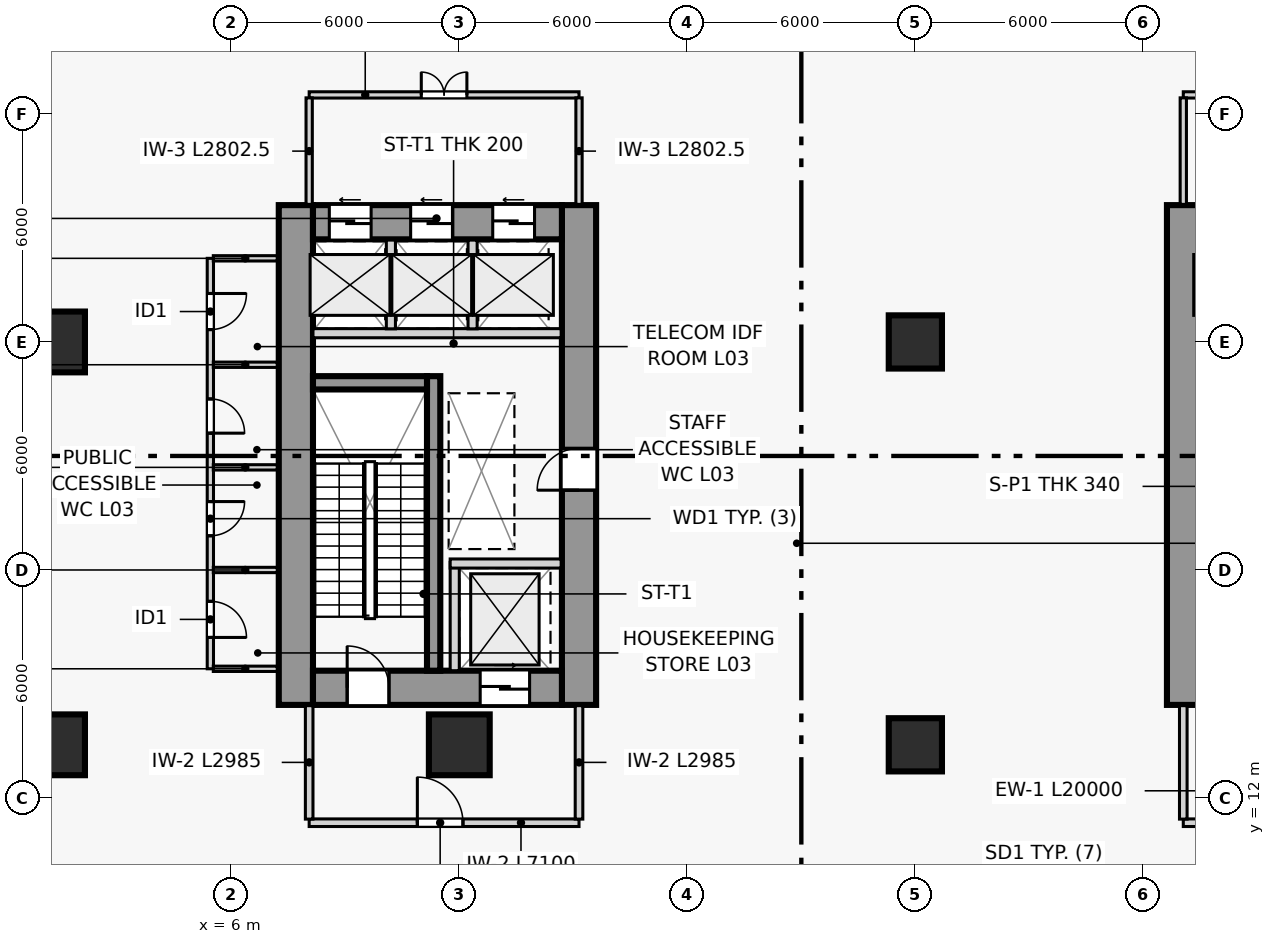
"""IFC4 building model, lengths in metres.
Left out: names, types, materials, properties, quantities, classifications, styles, units other than length and angle.
Written with IfcOpenShell. Run it as: python <this file> out.ifc"""

import sys

from ifc_helpers import new_model, si_unit, direction, frame, frame_2d, origin, origin_2d, place, context, subcontext, project, spatial, rectangle, extrude, source, transform, mapped, element, fill, save


model = new_model("IFC4")
c1 = context("Model", 3, precision=1e-05, world=origin(), true_north=direction((0.0, 1.0)))
c2 = subcontext(c1, "Body", "Model", "MODEL_VIEW")
j1 = project(units=[si_unit("LENGTHUNIT", "METRE"), si_unit("PLANEANGLEUNIT", "RADIAN")], contexts=[c1])
p1 = place(None, origin())
s1 = spatial("IfcSite", under=j1, at=p1, CompositionType="ELEMENT")
p2 = place(p1, origin())
s2 = spatial("IfcBuilding", under=s1, at=p2, CompositionType="ELEMENT")
p3 = place(p2, frame((0.0, 0.0, 13.5)))
s3 = spatial("IfcBuildingStorey", under=s2, at=p3, CompositionType="ELEMENT", Elevation=13.5)
p4 = place(p3, frame((7.7, 14.45, 0.0), z_axis=(0.0, 0.0, 1.0), x_axis=(0.0, 1.0, 0.0)))
e1 = element("IfcWall", 1, at=p4, inside=s3, PredefinedType="SHEAR", context=c2, shape_type="SweptSolid", body=[
    extrude(rectangle(XDim=13.15, YDim=0.9, at=frame_2d((6.575, 0.0))), origin(), (0.0, 0.0, 1.0), 4.5),
])
p5 = place(p3, frame((15.15, 14.45, 0.0), z_axis=(0.0, 0.0, 1.0), x_axis=(0.0, 1.0, 0.0)))
e2 = element("IfcWall", 2, at=p5, inside=s3, PredefinedType="SHEAR", context=c2, shape_type="SweptSolid", body=[
    extrude(rectangle(XDim=13.15, YDim=0.9, at=frame_2d((6.575, 0.0))), origin(), (0.0, 0.0, 1.0), 4.5),
])
p6 = place(p5, frame((5.65, 0.0, 0.0)))
e3 = element("IfcOpeningElement", 3, at=p6, cuts=e2, PredefinedType="OPENING", context=c2, shape_type="SweptSolid", body=[
    extrude(rectangle(XDim=1.1, YDim=2.2, at=frame_2d((0.55, 1.1))), frame((0.0, 0.46, 0.0), z_axis=(0.0, -1.0, 0.0), x_axis=(1.0, 0.0, 0.0)), (0.0, 0.0, 1.0), 0.92),
])
p7 = place(p3, frame((8.15, 14.9, 0.0), z_axis=(0.0, 0.0, 1.0), x_axis=(1.0, 0.0, 0.0)))
e4 = element("IfcWall", 4, at=p7, inside=s3, PredefinedType="SHEAR", context=c2, shape_type="SweptSolid", body=[
    extrude(rectangle(XDim=6.55, YDim=0.9, at=frame_2d((3.275, 0.0))), origin(), (0.0, 0.0, 1.0), 4.5),
])
p8 = place(p7, frame((0.9, 0.0, 0.0)))
e5 = element("IfcOpeningElement", 5, at=p8, cuts=e4, PredefinedType="OPENING", context=c2, shape_type="SweptSolid", body=[
    extrude(rectangle(XDim=1.1, YDim=2.2, at=frame_2d((0.55, 1.1))), frame((0.0, 0.46, 0.0), z_axis=(0.0, -1.0, 0.0), x_axis=(1.0, 0.0, 0.0)), (0.0, 0.0, 1.0), 0.92),
])
p9 = place(p7, frame((4.4, 0.0, 0.0)))
e6 = element("IfcOpeningElement", 6, at=p9, cuts=e4, PredefinedType="OPENING", context=c2, shape_type="SweptSolid", body=[
    extrude(rectangle(XDim=1.3, YDim=2.2, at=frame_2d((0.65, 1.1))), frame((0.0, 0.46, 0.0), z_axis=(0.0, -1.0, 0.0), x_axis=(1.0, 0.0, 0.0)), (0.0, 0.0, 1.0), 0.92),
])
p10 = place(p3, frame((8.15, 27.15, 0.0), z_axis=(0.0, 0.0, 1.0), x_axis=(1.0, 0.0, 0.0)))
e7 = element("IfcWall", 7, at=p10, inside=s3, PredefinedType="SHEAR", context=c2, shape_type="SweptSolid", body=[
    extrude(rectangle(XDim=6.55, YDim=0.9, at=frame_2d((3.275, 0.0))), origin(), (0.0, 0.0, 1.0), 4.5),
])
p11 = place(p10, frame((0.43, 0.0, 0.0)))
e8 = element("IfcOpeningElement", 8, at=p11, cuts=e7, PredefinedType="OPENING", context=c2, shape_type="SweptSolid", body=[
    extrude(rectangle(XDim=1.1, YDim=2.2, at=frame_2d((0.55, 1.1))), frame((0.0, 0.46, 0.0), z_axis=(0.0, -1.0, 0.0), x_axis=(1.0, 0.0, 0.0)), (0.0, 0.0, 1.0), 0.92),
])
p12 = place(p10, frame((2.57, 0.0, 0.0)))
e9 = element("IfcOpeningElement", 9, at=p12, cuts=e7, PredefinedType="OPENING", context=c2, shape_type="SweptSolid", body=[
    extrude(rectangle(XDim=1.1, YDim=2.2, at=frame_2d((0.55, 1.1))), frame((0.0, 0.46, 0.0), z_axis=(0.0, -1.0, 0.0), x_axis=(1.0, 0.0, 0.0)), (0.0, 0.0, 1.0), 0.92),
])
p13 = place(p10, frame((4.73, 0.0, 0.0)))
e10 = element("IfcOpeningElement", 10, at=p13, cuts=e7, PredefinedType="OPENING", context=c2, shape_type="SweptSolid", body=[
    extrude(rectangle(XDim=1.1, YDim=2.2, at=frame_2d((0.55, 1.1))), frame((0.0, 0.46, 0.0), z_axis=(0.0, -1.0, 0.0), x_axis=(1.0, 0.0, 0.0)), (0.0, 0.0, 1.0), 0.92),
])
p14 = place(p3, frame((31.07, 14.45, 0.0), z_axis=(0.0, 0.0, 1.0), x_axis=(0.0, 1.0, 0.0)))
e11 = element("IfcWall", 11, at=p14, inside=s3, PredefinedType="SHEAR", context=c2, shape_type="SweptSolid", body=[
    extrude(rectangle(XDim=13.15, YDim=0.9, at=frame_2d((6.575, 0.0))), origin(), (0.0, 0.0, 1.0), 4.5),
])
p15 = place(p3, frame((11.325, 15.35, 0.0), z_axis=(0.0, 0.0, 1.0), x_axis=(0.0, 1.0, 0.0)))
e12 = element("IfcWall", 12, at=p15, inside=s3, PredefinedType="SHEAR", context=c2, shape_type="SweptSolid", body=[
    extrude(rectangle(XDim=7.75, YDim=0.35, at=frame_2d((3.875, 0.0))), origin(), (0.0, 0.0, 1.0), 4.5),
])
p16 = place(p3, frame((8.15, 22.925, 0.0), z_axis=(0.0, 0.0, 1.0), x_axis=(1.0, 0.0, 0.0)))
e13 = element("IfcWall", 13, at=p16, inside=s3, PredefinedType="SHEAR", context=c2, shape_type="SweptSolid", body=[
    extrude(rectangle(XDim=3.0, YDim=0.35, at=frame_2d((1.5, 0.0))), origin(), (0.0, 0.0, 1.0), 4.5),
])
m1 = source(origin(), c2, "Body", "SweptSolid", [
    extrude(rectangle(XDim=1.6, YDim=1.6, at=origin_2d()), origin(), (0.0, 0.0, 1.0), 4.5),
])
for number, where, z_axis, x_axis in (
    (14, (1.35, 13.4, 0.0), (0.0, 0.0, 1.0), (1.0, 0.0, 0.0)),
    (15, (1.35, 24.0, 0.0), (0.0, 0.0, 1.0), (1.0, 0.0, 0.0)),
    (16, (12.0, 13.4, 0.0), (0.0, 0.0, 1.0), (1.0, 0.0, 0.0)),
):
    element("IfcColumn", number, at=place(p3, frame(where, z_axis=z_axis, x_axis=x_axis)), inside=s3, PredefinedType="COLUMN", context=c2, shape_type="MappedRepresentation", body=[
        mapped(m1, transform((0.0, 0.0, 0.0), scale=1.0)),
    ])
m2 = source(origin(), c2, "Body", "SweptSolid", [
    extrude(rectangle(XDim=1.4, YDim=1.4, at=origin_2d()), origin(), (0.0, 0.0, 1.0), 4.5),
])
for number, where, z_axis, x_axis in (
    (17, (24.0, 13.4, 0.0), (0.0, 0.0, 1.0), (1.0, 0.0, 0.0)),
    (18, (24.0, 24.0, 0.0), (0.0, 0.0, 1.0), (1.0, 0.0, 0.0)),
):
    element("IfcColumn", number, at=place(p3, frame(where, z_axis=z_axis, x_axis=x_axis)), inside=s3, PredefinedType="COLUMN", context=c2, shape_type="MappedRepresentation", body=[
        mapped(m2, transform((0.0, 0.0, 0.0), scale=1.0)),
    ])
p17 = place(p3, frame((11.88, 15.35, 0.0), z_axis=(0.0, 0.0, 1.0), x_axis=(0.0, 1.0, 0.0)))
e19 = element("IfcWall", 19, at=p17, inside=s3, PredefinedType="PARTITIONING", context=c2, shape_type="SweptSolid", body=[
    extrude(rectangle(XDim=2.85, YDim=0.24, at=frame_2d((1.425, 0.0))), origin(), (0.0, 0.0, 1.0), 4.16),
])
p18 = place(p3, frame((11.76, 18.17, 0.0), z_axis=(0.0, 0.0, 1.0), x_axis=(1.0, 0.0, 0.0)))
e20 = element("IfcWall", 20, at=p18, inside=s3, PredefinedType="PARTITIONING", context=c2, shape_type="SweptSolid", body=[
    extrude(rectangle(XDim=2.92, YDim=0.24, at=frame_2d((1.46, 0.0))), origin(), (0.0, 0.0, 1.0), 4.16),
])
p19 = place(p3, frame((8.05, 11.35, 0.0), z_axis=(0.0, 0.0, 1.0), x_axis=(1.0, 0.0, 0.0)))
e21 = element("IfcWall", 21, at=p19, inside=s3, PredefinedType="PARTITIONING", context=c2, shape_type="SweptSolid", body=[
    extrude(rectangle(XDim=7.1, YDim=0.2, at=frame_2d((3.55, 0.0))), origin(), (0.0, 0.0, 1.0), 4.16),
])
p20 = place(p19, frame((2.846, 0.0, 0.0)))
e22 = element("IfcOpeningElement", 22, at=p20, cuts=e21, PredefinedType="OPENING", context=c2, shape_type="SweptSolid", body=[
    extrude(rectangle(XDim=1.2, YDim=2.2, at=frame_2d((0.6, 1.1))), frame((0.0, 0.11, 0.0), z_axis=(0.0, -1.0, 0.0), x_axis=(1.0, 0.0, 0.0)), (0.0, 0.0, 1.0), 0.22),
])
for number, where, z_axis, x_axis in (
    (23, (8.05, 11.445, 0.0), (0.0, 0.0, 1.0), (0.0, 1.0, 0.0)),
    (24, (15.15, 11.445, 0.0), (0.0, 0.0, 1.0), (0.0, 1.0, 0.0)),
):
    element("IfcWall", number, at=place(p3, frame(where, z_axis=z_axis, x_axis=x_axis)), inside=s3, PredefinedType="PARTITIONING", context=c2, shape_type="SweptSolid", body=[
        extrude(rectangle(XDim=2.985, YDim=0.2, at=frame_2d((1.492, 0.0))), origin(), (0.0, 0.0, 1.0), 4.16),
    ])
p21 = place(p3, frame((31.05, 11.35, 0.0), z_axis=(0.0, 0.0, 1.0), x_axis=(1.0, 0.0, 0.0)))
e25 = element("IfcWall", 25, at=p21, inside=s3, PredefinedType="PARTITIONING", context=c2, shape_type="SweptSolid", body=[
    extrude(rectangle(XDim=6.2, YDim=0.2, at=frame_2d((3.1, 0.0))), origin(), (0.0, 0.0, 1.0), 4.16),
])
p22 = place(p21, frame((2.586, 0.0, 0.0)))
e26 = element("IfcOpeningElement", 26, at=p22, cuts=e25, PredefinedType="OPENING", context=c2, shape_type="SweptSolid", body=[
    extrude(rectangle(XDim=1.2, YDim=2.2, at=frame_2d((0.6, 1.1))), frame((0.0, 0.11, 0.0), z_axis=(0.0, -1.0, 0.0), x_axis=(1.0, 0.0, 0.0)), (0.0, 0.0, 1.0), 0.22),
])
p23 = place(p3, frame((31.05, 11.445, 0.0), z_axis=(0.0, 0.0, 1.0), x_axis=(0.0, 1.0, 0.0)))
e27 = element("IfcWall", 27, at=p23, inside=s3, PredefinedType="PARTITIONING", context=c2, shape_type="SweptSolid", body=[
    extrude(rectangle(XDim=2.985, YDim=0.2, at=frame_2d((1.492, 0.0))), origin(), (0.0, 0.0, 1.0), 4.16),
])
p24 = place(p3, frame((8.15, 24.23, 0.0), z_axis=(0.0, 0.0, 1.0), x_axis=(1.0, 0.0, 0.0)))
e28 = element("IfcWall", 28, at=p24, inside=s3, PredefinedType="PARTITIONING", context=c2, shape_type="SweptSolid", body=[
    extrude(rectangle(XDim=6.53, YDim=0.24, at=frame_2d((3.265, 0.0))), origin(), (0.0, 0.0, 1.0), 4.16),
])
for number, where, z_axis, x_axis in (
    (29, (10.2, 24.345, 0.0), (0.0, 0.0, 1.0), (0.0, 1.0, 0.0)),
    (30, (12.35, 24.345, 0.0), (0.0, 0.0, 1.0), (0.0, 1.0, 0.0)),
):
    element("IfcWall", number, at=place(p3, frame(where, z_axis=z_axis, x_axis=x_axis)), inside=s3, PredefinedType="PARTITIONING", context=c2, shape_type="SweptSolid", body=[
        extrude(rectangle(XDim=2.335, YDim=0.24, at=frame_2d((1.167, 0.0))), origin(), (0.0, 0.0, 1.0), 4.16),
    ])
p25 = place(p3, frame((8.05, 30.5, 0.0), z_axis=(0.0, 0.0, 1.0), x_axis=(1.0, 0.0, 0.0)))
e31 = element("IfcWall", 31, at=p25, inside=s3, PredefinedType="PARTITIONING", context=c2, shape_type="SweptSolid", body=[
    extrude(rectangle(XDim=7.1, YDim=0.165, at=frame_2d((3.55, 0.0))), origin(), (0.0, 0.0, 1.0), 4.16),
])
p26 = place(p25, frame((2.95, 0.0, 0.0)))
e32 = element("IfcOpeningElement", 32, at=p26, cuts=e31, PredefinedType="OPENING", context=c2, shape_type="SweptSolid", body=[
    extrude(rectangle(XDim=1.2, YDim=2.2, at=frame_2d((0.6, 1.1))), frame((0.0, 0.093, 0.0), z_axis=(0.0, -1.0, 0.0), x_axis=(1.0, 0.0, 0.0)), (0.0, 0.0, 1.0), 0.185),
])
for number, where, z_axis, x_axis in (
    (33, (8.05, 27.62, 0.0), (0.0, 0.0, 1.0), (0.0, 1.0, 0.0)),
    (34, (15.15, 27.62, 0.0), (0.0, 0.0, 1.0), (0.0, 1.0, 0.0)),
):
    element("IfcWall", number, at=place(p3, frame(where, z_axis=z_axis, x_axis=x_axis)), inside=s3, PredefinedType="PARTITIONING", context=c2, shape_type="SweptSolid", body=[
        extrude(rectangle(XDim=2.802, YDim=0.165, at=frame_2d((1.401, 0.0))), origin(), (0.0, 0.0, 1.0), 4.16),
    ])
p27 = place(p3, frame((31.05, 30.5, 0.0), z_axis=(0.0, 0.0, 1.0), x_axis=(1.0, 0.0, 0.0)))
e35 = element("IfcWall", 35, at=p27, inside=s3, PredefinedType="PARTITIONING", context=c2, shape_type="SweptSolid", body=[
    extrude(rectangle(XDim=6.2, YDim=0.165, at=frame_2d((3.1, 0.0))), origin(), (0.0, 0.0, 1.0), 4.16),
])
p28 = place(p27, frame((2.5, 0.0, 0.0)))
e36 = element("IfcOpeningElement", 36, at=p28, cuts=e35, PredefinedType="OPENING", context=c2, shape_type="SweptSolid", body=[
    extrude(rectangle(XDim=1.2, YDim=2.2, at=frame_2d((0.6, 1.1))), frame((0.0, 0.093, 0.0), z_axis=(0.0, -1.0, 0.0), x_axis=(1.0, 0.0, 0.0)), (0.0, 0.0, 1.0), 0.185),
])
p29 = place(p3, frame((31.05, 27.62, 0.0), z_axis=(0.0, 0.0, 1.0), x_axis=(0.0, 1.0, 0.0)))
e37 = element("IfcWall", 37, at=p29, inside=s3, PredefinedType="PARTITIONING", context=c2, shape_type="SweptSolid", body=[
    extrude(rectangle(XDim=2.802, YDim=0.165, at=frame_2d((1.401, 0.0))), origin(), (0.0, 0.0, 1.0), 4.16),
])
p30 = place(p3, frame((5.45, 15.4, 0.0), z_axis=(0.0, 0.0, 1.0), x_axis=(0.0, 1.0, 0.0)))
e38 = element("IfcWall", 38, at=p30, inside=s3, PredefinedType="PARTITIONING", context=c2, shape_type="SweptSolid", body=[
    extrude(rectangle(XDim=10.8, YDim=0.165, at=frame_2d((5.4, 0.0))), origin(), (0.0, 0.0, 1.0), 4.16),
])
p31 = place(p30, frame((0.825, 0.0, 0.0)))
e39 = element("IfcOpeningElement", 39, at=p31, cuts=e38, PredefinedType="OPENING", context=c2, shape_type="SweptSolid", body=[
    extrude(rectangle(XDim=0.95, YDim=2.1, at=frame_2d((0.475, 1.05))), frame((0.0, 0.093, 0.0), z_axis=(0.0, -1.0, 0.0), x_axis=(1.0, 0.0, 0.0)), (0.0, 0.0, 1.0), 0.185),
])
p32 = place(p30, frame((3.5, 0.0, 0.0)))
e40 = element("IfcOpeningElement", 40, at=p32, cuts=e38, PredefinedType="OPENING", context=c2, shape_type="SweptSolid", body=[
    extrude(rectangle(XDim=0.9, YDim=2.1, at=frame_2d((0.45, 1.05))), frame((0.0, 0.093, 0.0), z_axis=(0.0, -1.0, 0.0), x_axis=(1.0, 0.0, 0.0)), (0.0, 0.0, 1.0), 0.185),
])
p33 = place(p30, frame((6.2, 0.0, 0.0)))
e41 = element("IfcOpeningElement", 41, at=p33, cuts=e38, PredefinedType="OPENING", context=c2, shape_type="SweptSolid", body=[
    extrude(rectangle(XDim=0.9, YDim=2.1, at=frame_2d((0.45, 1.05))), frame((0.0, 0.093, 0.0), z_axis=(0.0, -1.0, 0.0), x_axis=(1.0, 0.0, 0.0)), (0.0, 0.0, 1.0), 0.185),
])
p34 = place(p30, frame((8.925, 0.0, 0.0)))
e42 = element("IfcOpeningElement", 42, at=p34, cuts=e38, PredefinedType="OPENING", context=c2, shape_type="SweptSolid", body=[
    extrude(rectangle(XDim=0.95, YDim=2.1, at=frame_2d((0.475, 1.05))), frame((0.0, 0.093, 0.0), z_axis=(0.0, -1.0, 0.0), x_axis=(1.0, 0.0, 0.0)), (0.0, 0.0, 1.0), 0.185),
])
for number, where, z_axis, x_axis in (
    (43, (5.528, 15.4, 0.0), (0.0, 0.0, 1.0), (1.0, 0.0, 0.0)),
    (44, (5.528, 26.2, 0.0), (0.0, 0.0, 1.0), (1.0, 0.0, 0.0)),
):
    element("IfcWall", number, at=place(p3, frame(where, z_axis=z_axis, x_axis=x_axis)), inside=s3, PredefinedType="PARTITIONING", context=c2, shape_type="SweptSolid", body=[
        extrude(rectangle(XDim=1.682, YDim=0.14, at=frame_2d((0.841, 0.0))), origin(), (0.0, 0.0, 1.0), 4.16),
    ])
for number, where, z_axis, x_axis in (
    (45, (5.528, 18.0, 0.0), (0.0, 0.0, 1.0), (1.0, 0.0, 0.0)),
    (46, (5.528, 20.7, 0.0), (0.0, 0.0, 1.0), (1.0, 0.0, 0.0)),
):
    element("IfcWall", number, at=place(p3, frame(where, z_axis=z_axis, x_axis=x_axis)), inside=s3, PredefinedType="PLUMBINGWALL", context=c2, shape_type="SweptSolid", body=[
        extrude(rectangle(XDim=1.682, YDim=0.14, at=frame_2d((0.841, 0.0))), origin(), (0.0, 0.0, 1.0), 4.16),
    ])
p35 = place(p3, frame((5.528, 23.4, 0.0), z_axis=(0.0, 0.0, 1.0), x_axis=(1.0, 0.0, 0.0)))
e47 = element("IfcWall", 47, at=p35, inside=s3, PredefinedType="PARTITIONING", context=c2, shape_type="SweptSolid", body=[
    extrude(rectangle(XDim=1.682, YDim=0.14, at=frame_2d((0.841, 0.0))), origin(), (0.0, 0.0, 1.0), 4.16),
])
m3 = source(origin(), c2, "Body", "SweptSolid", [
    extrude(rectangle(XDim=1.1, YDim=2.2, at=frame_2d((0.55, 1.1))), frame((0.0, 0.025, 0.0), z_axis=(0.0, -1.0, 0.0), x_axis=(1.0, 0.0, 0.0)), (0.0, 0.0, 1.0), 0.05),
])
p36 = place(p8, origin())
e48 = element("IfcDoor", 48, at=p36, inside=s3, OperationType="SINGLE_SWING_LEFT", PredefinedType="DOOR", context=c2, shape_type="MappedRepresentation", body=[
    mapped(m3, transform((0.0, 0.0, 0.0), scale=1.0)),
])
fill(e5, e48)
m4 = source(origin(), c2, "Body", "SweptSolid", [
    extrude(rectangle(XDim=1.3, YDim=2.2, at=frame_2d((0.65, 1.1))), frame((0.0, 0.025, 0.0), z_axis=(0.0, -1.0, 0.0), x_axis=(1.0, 0.0, 0.0)), (0.0, 0.0, 1.0), 0.05),
])
p37 = place(p9, origin())
e49 = element("IfcDoor", 49, at=p37, inside=s3, OperationType="SLIDING_TO_RIGHT", PredefinedType="DOOR", context=c2, shape_type="MappedRepresentation", body=[
    mapped(m4, transform((0.0, 0.0, 0.0), scale=1.0)),
])
fill(e6, e49)
m5 = source(origin(), c2, "Body", "SweptSolid", [
    extrude(rectangle(XDim=1.2, YDim=2.2, at=frame_2d((0.6, 1.1))), frame((0.0, 0.025, 0.0), z_axis=(0.0, -1.0, 0.0), x_axis=(1.0, 0.0, 0.0)), (0.0, 0.0, 1.0), 0.05),
])
p38 = place(p20, origin())
e50 = element("IfcDoor", 50, at=p38, inside=s3, OperationType="SINGLE_SWING_LEFT", PredefinedType="DOOR", context=c2, shape_type="MappedRepresentation", body=[
    mapped(m5, transform((0.0, 0.0, 0.0), scale=1.0)),
])
fill(e22, e50)
m6 = source(origin(), c2, "Body", "SweptSolid", [
    extrude(rectangle(XDim=1.1, YDim=2.2, at=frame_2d((0.55, 1.1))), frame((0.0, 0.025, 0.0), z_axis=(0.0, -1.0, 0.0), x_axis=(1.0, 0.0, 0.0)), (0.0, 0.0, 1.0), 0.05),
])
p39 = place(p11, origin())
e51 = element("IfcDoor", 51, at=p39, inside=s3, OperationType="SLIDING_TO_LEFT", PredefinedType="DOOR", context=c2, shape_type="MappedRepresentation", body=[
    mapped(m6, transform((0.0, 0.0, 0.0), scale=1.0)),
])
fill(e8, e51)
p40 = place(p12, origin())
e52 = element("IfcDoor", 52, at=p40, inside=s3, OperationType="SLIDING_TO_LEFT", PredefinedType="DOOR", context=c2, shape_type="MappedRepresentation", body=[
    mapped(m6, transform((0.0, 0.0, 0.0), scale=1.0)),
])
fill(e9, e52)
p41 = place(p13, origin())
e53 = element("IfcDoor", 53, at=p41, inside=s3, OperationType="SLIDING_TO_LEFT", PredefinedType="DOOR", context=c2, shape_type="MappedRepresentation", body=[
    mapped(m6, transform((0.0, 0.0, 0.0), scale=1.0)),
])
fill(e10, e53)
p42 = place(p26, origin())
e54 = element("IfcDoor", 54, at=p42, inside=s3, OperationType="DOUBLE_DOOR_SINGLE_SWING", PredefinedType="DOOR", context=c2, shape_type="MappedRepresentation", body=[
    mapped(m5, transform((0.0, 0.0, 0.0), scale=1.0)),
])
fill(e32, e54)
p43 = place(p6, origin())
e55 = element("IfcDoor", 55, at=p43, inside=s3, OperationType="SINGLE_SWING_LEFT", PredefinedType="DOOR", context=c2, shape_type="MappedRepresentation", body=[
    mapped(m3, transform((0.0, 0.0, 0.0), scale=1.0)),
])
fill(e3, e55)
m7 = source(origin(), c2, "Body", "SweptSolid", [
    extrude(rectangle(XDim=0.95, YDim=2.1, at=frame_2d((0.475, 1.05))), frame((0.0, 0.025, 0.0), z_axis=(0.0, -1.0, 0.0), x_axis=(1.0, 0.0, 0.0)), (0.0, 0.0, 1.0), 0.05),
])
p44 = place(p31, frame((0.95, 0.0, 0.0), z_axis=(0.0, 0.0, 1.0), x_axis=(-1.0, 0.0, 0.0)))
e56 = element("IfcDoor", 56, at=p44, inside=s3, OperationType="SINGLE_SWING_RIGHT", PredefinedType="DOOR", context=c2, shape_type="MappedRepresentation", body=[
    mapped(m7, transform((0.0, 0.0, 0.0), scale=1.0)),
])
fill(e39, e56)
m8 = source(origin(), c2, "Body", "SweptSolid", [
    extrude(rectangle(XDim=0.9, YDim=2.1, at=frame_2d((0.45, 1.05))), frame((0.0, 0.025, 0.0), z_axis=(0.0, -1.0, 0.0), x_axis=(1.0, 0.0, 0.0)), (0.0, 0.0, 1.0), 0.05),
])
p45 = place(p32, frame((0.9, 0.0, 0.0), z_axis=(0.0, 0.0, 1.0), x_axis=(-1.0, 0.0, 0.0)))
e57 = element("IfcDoor", 57, at=p45, inside=s3, OperationType="SINGLE_SWING_LEFT", PredefinedType="DOOR", context=c2, shape_type="MappedRepresentation", body=[
    mapped(m8, transform((0.0, 0.0, 0.0), scale=1.0)),
])
fill(e40, e57)
p46 = place(p33, frame((0.9, 0.0, 0.0), z_axis=(0.0, 0.0, 1.0), x_axis=(-1.0, 0.0, 0.0)))
e58 = element("IfcDoor", 58, at=p46, inside=s3, OperationType="SINGLE_SWING_RIGHT", PredefinedType="DOOR", context=c2, shape_type="MappedRepresentation", body=[
    mapped(m8, transform((0.0, 0.0, 0.0), scale=1.0)),
])
fill(e41, e58)
p47 = place(p34, frame((0.95, 0.0, 0.0), z_axis=(0.0, 0.0, 1.0), x_axis=(-1.0, 0.0, 0.0)))
e59 = element("IfcDoor", 59, at=p47, inside=s3, OperationType="SINGLE_SWING_LEFT", PredefinedType="DOOR", context=c2, shape_type="MappedRepresentation", body=[
    mapped(m7, transform((0.0, 0.0, 0.0), scale=1.0)),
])
fill(e42, e59)
save(model, sys.argv[1])
